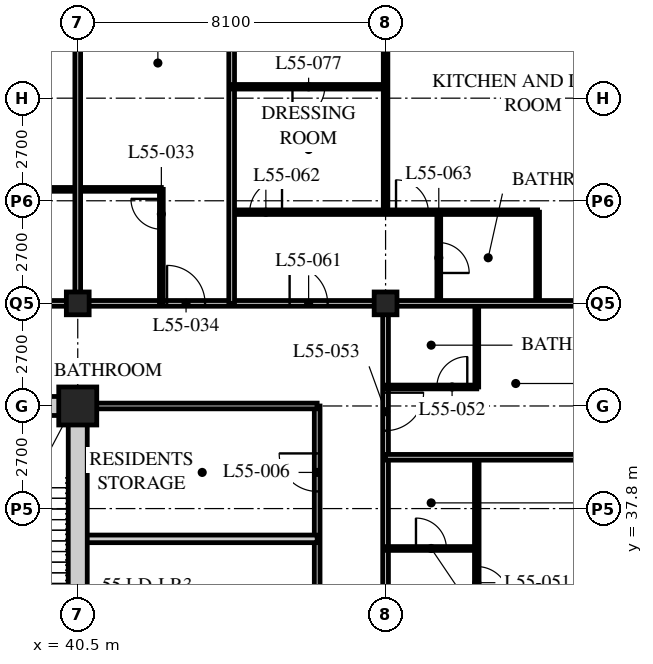
"""IFC4 building model, lengths in metres.
Left out: names, types, materials, properties, quantities, classifications, styles, units other than length and angle.
Written with IfcOpenShell. Run it as: python <this file> out.ifc"""

import sys

from ifc_helpers import new_model, si_unit, direction, frame, frame_2d, origin, origin_2d, place, context, subcontext, project, spatial, rectangle, hollow_rectangle, extrude, element, fill, save


model = new_model("IFC4")
c1 = context("Model", 3, precision=1e-05, world=origin(), true_north=direction((0.0, 1.0)))
c2 = subcontext(c1, "Body", "Model", "MODEL_VIEW")
j1 = project(units=[si_unit("LENGTHUNIT", "METRE"), si_unit("PLANEANGLEUNIT", "RADIAN")], contexts=[c1])
p1 = place(None, origin())
s1 = spatial("IfcSite", under=j1, at=p1, CompositionType="ELEMENT")
p2 = place(p1, origin())
s2 = spatial("IfcBuilding", under=s1, at=p2, CompositionType="ELEMENT")
p3 = place(p2, frame((0.0, 0.0, 213.6)))
s3 = spatial("IfcBuildingStorey", under=s2, at=p3, CompositionType="ELEMENT", Elevation=213.6)
p4 = place(p3, frame((40.5, 40.5, 0.0), z_axis=(0.0, 0.0, 1.0), x_axis=(1.0, 0.0, 0.0)))
e1 = element("IfcColumn", 1, at=p4, inside=s3, PredefinedType="COLUMN", context=c2, shape_type="SweptSolid", body=[
    extrude(hollow_rectangle(XDim=1.0, YDim=1.0, WallThickness=0.1, at=origin_2d()), origin(), (0.0, 0.0, 1.0), 3.6),
])
for number, where, z_axis, x_axis in (
    (2, (40.5, 43.2, 0.0), (0.0, 0.0, 1.0), (1.0, 0.0, 0.0)),
    (3, (48.6, 43.2, 0.0), (0.0, 0.0, 1.0), (1.0, 0.0, 0.0)),
):
    element("IfcColumn", number, at=place(p3, frame(where, z_axis=z_axis, x_axis=x_axis)), inside=s3, PredefinedType="COLUMN", context=c2, shape_type="SweptSolid", body=[
        extrude(hollow_rectangle(XDim=0.6, YDim=0.6, WallThickness=0.05, at=origin_2d()), origin(), (0.0, 0.0, 1.0), 3.6),
    ])
p5 = place(p3, frame((12.15, 43.2, 0.0), z_axis=(0.0, 0.0, 1.0), x_axis=(1.0, 0.0, 0.0)))
e4 = element("IfcWall", 4, at=p5, inside=s3, PredefinedType="PARTITIONING", context=c2, shape_type="SweptSolid", body=[
    extrude(rectangle(XDim=36.45, YDim=0.15, at=frame_2d((18.225, 0.0))), origin(), (0.0, 0.0, 1.0), 2.778),
])
p6 = place(p5, frame((4.95, 0.0, 0.0)))
e5 = element("IfcOpeningElement", 5, at=p6, cuts=e4, PredefinedType="OPENING", context=c2, shape_type="SweptSolid", body=[
    extrude(rectangle(XDim=1.0, YDim=2.1, at=frame_2d((0.5, 1.05))), frame((0.0, 0.085, 0.0), z_axis=(0.0, -1.0, 0.0), x_axis=(1.0, 0.0, 0.0)), (0.0, 0.0, 1.0), 0.17),
])
p7 = place(p5, frame((25.0, 0.0, 0.0)))
e6 = element("IfcOpeningElement", 6, at=p7, cuts=e4, PredefinedType="OPENING", context=c2, shape_type="SweptSolid", body=[
    extrude(rectangle(XDim=1.0, YDim=2.1, at=frame_2d((0.5, 1.05))), frame((0.0, 0.085, 0.0), z_axis=(0.0, -1.0, 0.0), x_axis=(1.0, 0.0, 0.0)), (0.0, 0.0, 1.0), 0.17),
])
p8 = place(p5, frame((30.7, 0.0, 0.0)))
e7 = element("IfcOpeningElement", 7, at=p8, cuts=e4, PredefinedType="OPENING", context=c2, shape_type="SweptSolid", body=[
    extrude(rectangle(XDim=1.0, YDim=2.1, at=frame_2d((0.5, 1.05))), frame((0.0, 0.085, 0.0), z_axis=(0.0, -1.0, 0.0), x_axis=(1.0, 0.0, 0.0)), (0.0, 0.0, 1.0), 0.17),
])
p9 = place(p5, frame((33.925, 0.0, 0.0)))
e8 = element("IfcOpeningElement", 8, at=p9, cuts=e4, PredefinedType="OPENING", context=c2, shape_type="SweptSolid", body=[
    extrude(rectangle(XDim=1.0, YDim=2.1, at=frame_2d((0.5, 1.05))), frame((0.0, 0.085, 0.0), z_axis=(0.0, -1.0, 0.0), x_axis=(1.0, 0.0, 0.0)), (0.0, 0.0, 1.0), 0.17),
])
p10 = place(p5, frame((1.525, 0.0, 0.0)))
e9 = element("IfcOpeningElement", 9, at=p10, cuts=e4, PredefinedType="OPENING", context=c2, shape_type="SweptSolid", body=[
    extrude(rectangle(XDim=1.0, YDim=2.1, at=frame_2d((0.5, 1.05))), frame((0.0, 0.085, 0.0), z_axis=(0.0, -1.0, 0.0), x_axis=(1.0, 0.0, 0.0)), (0.0, 0.0, 1.0), 0.17),
])
p11 = place(p3, frame((48.6, 18.9, 0.0), z_axis=(0.0, 0.0, 1.0), x_axis=(0.0, 1.0, 0.0)))
e10 = element("IfcWall", 10, at=p11, inside=s3, PredefinedType="PARTITIONING", context=c2, shape_type="SweptSolid", body=[
    extrude(rectangle(XDim=24.3, YDim=0.15, at=frame_2d((12.15, 0.0))), origin(), (0.0, 0.0, 1.0), 2.778),
])
p12 = place(p11, frame((0.9, 0.0, 0.0)))
e11 = element("IfcOpeningElement", 11, at=p12, cuts=e10, PredefinedType="OPENING", context=c2, shape_type="SweptSolid", body=[
    extrude(rectangle(XDim=1.0, YDim=2.1, at=frame_2d((0.5, 1.05))), frame((0.0, 0.085, 0.0), z_axis=(0.0, -1.0, 0.0), x_axis=(1.0, 0.0, 0.0)), (0.0, 0.0, 1.0), 0.17),
])
p13 = place(p11, frame((20.95, 0.0, 0.0)))
e12 = element("IfcOpeningElement", 12, at=p13, cuts=e10, PredefinedType="OPENING", context=c2, shape_type="SweptSolid", body=[
    extrude(rectangle(XDim=1.0, YDim=2.1, at=frame_2d((0.5, 1.05))), frame((0.0, 0.085, 0.0), z_axis=(0.0, -1.0, 0.0), x_axis=(1.0, 0.0, 0.0)), (0.0, 0.0, 1.0), 0.17),
])
p14 = place(p3, frame((46.8, 20.7, 0.0), z_axis=(0.0, 0.0, 1.0), x_axis=(0.0, 1.0, 0.0)))
e13 = element("IfcWall", 13, at=p14, inside=s3, PredefinedType="PARTITIONING", context=c2, shape_type="SweptSolid", body=[
    extrude(rectangle(XDim=19.8, YDim=0.15, at=frame_2d((9.9, 0.0))), origin(), (0.0, 0.0, 1.0), 3.39),
])
p15 = place(p14, frame((4.052, 0.0, 0.0)))
e14 = element("IfcOpeningElement", 14, at=p15, cuts=e13, PredefinedType="OPENING", context=c2, shape_type="SweptSolid", body=[
    extrude(rectangle(XDim=1.0, YDim=2.1, at=frame_2d((0.5, 1.05))), frame((0.0, 0.085, 0.0), z_axis=(0.0, -1.0, 0.0), x_axis=(1.0, 0.0, 0.0)), (0.0, 0.0, 1.0), 0.17),
])
p16 = place(p14, frame((8.102, 0.0, 0.0)))
e15 = element("IfcOpeningElement", 15, at=p16, cuts=e13, PredefinedType="OPENING", context=c2, shape_type="SweptSolid", body=[
    extrude(rectangle(XDim=1.0, YDim=2.1, at=frame_2d((0.5, 1.05))), frame((0.0, 0.085, 0.0), z_axis=(0.0, -1.0, 0.0), x_axis=(1.0, 0.0, 0.0)), (0.0, 0.0, 1.0), 0.17),
])
p17 = place(p14, frame((13.502, 0.0, 0.0)))
e16 = element("IfcOpeningElement", 16, at=p17, cuts=e13, PredefinedType="OPENING", context=c2, shape_type="SweptSolid", body=[
    extrude(rectangle(XDim=1.0, YDim=2.1, at=frame_2d((0.5, 1.05))), frame((0.0, 0.085, 0.0), z_axis=(0.0, -1.0, 0.0), x_axis=(1.0, 0.0, 0.0)), (0.0, 0.0, 1.0), 0.17),
])
p18 = place(p14, frame((17.552, 0.0, 0.0)))
e17 = element("IfcOpeningElement", 17, at=p18, cuts=e13, PredefinedType="OPENING", context=c2, shape_type="SweptSolid", body=[
    extrude(rectangle(XDim=1.0, YDim=2.1, at=frame_2d((0.5, 1.05))), frame((0.0, 0.085, 0.0), z_axis=(0.0, -1.0, 0.0), x_axis=(1.0, 0.0, 0.0)), (0.0, 0.0, 1.0), 0.17),
])
p19 = place(p3, frame((46.8, 40.5, 0.0), z_axis=(0.0, 0.0, 1.0), x_axis=(-1.0, 0.0, 0.0)))
e18 = element("IfcWall", 18, at=p19, inside=s3, PredefinedType="PARTITIONING", context=c2, shape_type="SweptSolid", body=[
    extrude(rectangle(XDim=6.1, YDim=0.15, at=frame_2d((3.05, 0.0))), origin(), (0.0, 0.0, 1.0), 3.39),
])
p20 = place(p3, frame((46.8, 37.003, 0.0), z_axis=(0.0, 0.0, 1.0), x_axis=(-1.0, 0.0, 0.0)))
e19 = element("IfcWall", 19, at=p20, inside=s3, PredefinedType="SOLIDWALL", context=c2, shape_type="SweptSolid", body=[
    extrude(rectangle(XDim=6.3, YDim=0.2, at=frame_2d((3.15, 0.0))), origin(), (0.0, 0.0, 1.0), 3.39),
])
p21 = place(p3, frame((38.3, 46.2, 0.0), z_axis=(0.0, 0.0, 1.0), x_axis=(1.0, 0.0, 0.0)))
e20 = element("IfcWall", 20, at=p21, inside=s3, PredefinedType="PARTITIONING", context=c2, shape_type="SweptSolid", body=[
    extrude(rectangle(XDim=4.4, YDim=0.1, at=frame_2d((2.2, 0.0))), origin(), (0.0, 0.0, 1.0), 3.39),
])
p22 = place(p3, frame((40.5, 43.2, 0.0), z_axis=(0.0, 0.0, 1.0), x_axis=(0.0, 1.0, 0.0)))
e21 = element("IfcWall", 21, at=p22, inside=s3, PredefinedType="PARTITIONING", context=c2, shape_type="SweptSolid", body=[
    extrude(rectangle(XDim=15.9, YDim=0.15, at=frame_2d((7.95, 0.0))), origin(), (0.0, 0.0, 1.0), 2.778),
])
p23 = place(p3, frame((42.7, 43.2, 0.0), z_axis=(0.0, 0.0, 1.0), x_axis=(0.0, 1.0, 0.0)))
e22 = element("IfcWall", 22, at=p23, inside=s3, PredefinedType="PARTITIONING", context=c2, shape_type="SweptSolid", body=[
    extrude(rectangle(XDim=3.0, YDim=0.1, at=frame_2d((1.5, 0.0))), origin(), (0.0, 0.0, 1.0), 3.39),
])
p24 = place(p23, frame((1.95, 0.0, 0.0)))
e23 = element("IfcOpeningElement", 23, at=p24, cuts=e22, PredefinedType="OPENING", context=c2, shape_type="SweptSolid", body=[
    extrude(rectangle(XDim=0.8, YDim=2.1, at=frame_2d((0.4, 1.05))), frame((0.0, 0.06, 0.0), z_axis=(0.0, -1.0, 0.0), x_axis=(1.0, 0.0, 0.0)), (0.0, 0.0, 1.0), 0.12),
])
p25 = place(p3, frame((51.0, 18.9, 0.0), z_axis=(0.0, 0.0, 1.0), x_axis=(0.0, 1.0, 0.0)))
e24 = element("IfcWall", 24, at=p25, inside=s3, PredefinedType="PARTITIONING", context=c2, shape_type="SweptSolid", body=[
    extrude(rectangle(XDim=20.25, YDim=0.12, at=frame_2d((10.125, 0.0))), origin(), (0.0, 0.0, 1.0), 3.39),
])
p26 = place(p25, frame((0.975, 0.0, 0.0)))
e25 = element("IfcOpeningElement", 25, at=p26, cuts=e24, PredefinedType="OPENING", context=c2, shape_type="SweptSolid", body=[
    extrude(rectangle(XDim=0.85, YDim=2.1, at=frame_2d((0.425, 1.05))), frame((0.0, 0.07, 0.0), z_axis=(0.0, -1.0, 0.0), x_axis=(1.0, 0.0, 0.0)), (0.0, 0.0, 1.0), 0.14),
])
p27 = place(p25, frame((8.425, 0.0, 0.0)))
e26 = element("IfcOpeningElement", 26, at=p27, cuts=e24, PredefinedType="OPENING", context=c2, shape_type="SweptSolid", body=[
    extrude(rectangle(XDim=0.85, YDim=2.1, at=frame_2d((0.425, 1.05))), frame((0.0, 0.07, 0.0), z_axis=(0.0, -1.0, 0.0), x_axis=(1.0, 0.0, 0.0)), (0.0, 0.0, 1.0), 0.14),
])
p28 = place(p25, frame((12.475, 0.0, 0.0)))
e27 = element("IfcOpeningElement", 27, at=p28, cuts=e24, PredefinedType="OPENING", context=c2, shape_type="SweptSolid", body=[
    extrude(rectangle(XDim=0.85, YDim=2.1, at=frame_2d((0.425, 1.05))), frame((0.0, 0.07, 0.0), z_axis=(0.0, -1.0, 0.0), x_axis=(1.0, 0.0, 0.0)), (0.0, 0.0, 1.0), 0.14),
])
p29 = place(p25, frame((16.525, 0.0, 0.0)))
e28 = element("IfcOpeningElement", 28, at=p29, cuts=e24, PredefinedType="OPENING", context=c2, shape_type="SweptSolid", body=[
    extrude(rectangle(XDim=0.85, YDim=2.1, at=frame_2d((0.425, 1.05))), frame((0.0, 0.07, 0.0), z_axis=(0.0, -1.0, 0.0), x_axis=(1.0, 0.0, 0.0)), (0.0, 0.0, 1.0), 0.14),
])
p30 = place(p3, frame((48.6, 36.75, 0.0), z_axis=(0.0, 0.0, 1.0), x_axis=(1.0, 0.0, 0.0)))
e29 = element("IfcWall", 29, at=p30, inside=s3, PredefinedType="PARTITIONING", context=c2, shape_type="SweptSolid", body=[
    extrude(rectangle(XDim=2.4, YDim=0.1, at=frame_2d((1.2, 0.0))), origin(), (0.0, 0.0, 1.0), 3.39),
])
p31 = place(p30, frame((0.8, 0.0, 0.0)))
e30 = element("IfcOpeningElement", 30, at=p31, cuts=e29, PredefinedType="OPENING", context=c2, shape_type="SweptSolid", body=[
    extrude(rectangle(XDim=0.8, YDim=2.1, at=frame_2d((0.4, 1.05))), frame((0.0, 0.06, 0.0), z_axis=(0.0, -1.0, 0.0), x_axis=(1.0, 0.0, 0.0)), (0.0, 0.0, 1.0), 0.12),
])
p32 = place(p3, frame((48.6, 39.15, 0.0), z_axis=(0.0, 0.0, 1.0), x_axis=(1.0, 0.0, 0.0)))
e31 = element("IfcWall", 31, at=p32, inside=s3, PredefinedType="PARTITIONING", context=c2, shape_type="SweptSolid", body=[
    extrude(rectangle(XDim=7.8, YDim=0.15, at=frame_2d((3.9, 0.0))), origin(), (0.0, 0.0, 1.0), 3.39),
])
p33 = place(p3, frame((51.0, 41.0, 0.0), z_axis=(0.0, 0.0, 1.0), x_axis=(0.0, 1.0, 0.0)))
e32 = element("IfcWall", 32, at=p33, inside=s3, PredefinedType="PARTITIONING", context=c2, shape_type="SweptSolid", body=[
    extrude(rectangle(XDim=2.2, YDim=0.1, at=frame_2d((1.1, 0.0))), origin(), (0.0, 0.0, 1.0), 3.39),
])
p34 = place(p3, frame((48.6, 41.0, 0.0), z_axis=(0.0, 0.0, 1.0), x_axis=(1.0, 0.0, 0.0)))
e33 = element("IfcWall", 33, at=p34, inside=s3, PredefinedType="PARTITIONING", context=c2, shape_type="SweptSolid", body=[
    extrude(rectangle(XDim=2.4, YDim=0.1, at=frame_2d((1.2, 0.0))), origin(), (0.0, 0.0, 1.0), 3.39),
])
p35 = place(p34, frame((1.35, 0.0, 0.0)))
e34 = element("IfcOpeningElement", 34, at=p35, cuts=e33, PredefinedType="OPENING", context=c2, shape_type="SweptSolid", body=[
    extrude(rectangle(XDim=0.8, YDim=2.1, at=frame_2d((0.4, 1.05))), frame((0.0, 0.06, 0.0), z_axis=(0.0, -1.0, 0.0), x_axis=(1.0, 0.0, 0.0)), (0.0, 0.0, 1.0), 0.12),
])
p36 = place(p3, frame((44.55, 45.6, 0.0), z_axis=(0.0, 0.0, 1.0), x_axis=(1.0, 0.0, 0.0)))
e35 = element("IfcWall", 35, at=p36, inside=s3, PredefinedType="PARTITIONING", context=c2, shape_type="SweptSolid", body=[
    extrude(rectangle(XDim=8.05, YDim=0.12, at=frame_2d((4.025, 0.0))), origin(), (0.0, 0.0, 1.0), 3.39),
])
p37 = place(p36, frame((0.475, 0.0, 0.0)))
e36 = element("IfcOpeningElement", 36, at=p37, cuts=e35, PredefinedType="OPENING", context=c2, shape_type="SweptSolid", body=[
    extrude(rectangle(XDim=0.85, YDim=2.1, at=frame_2d((0.425, 1.05))), frame((0.0, 0.07, 0.0), z_axis=(0.0, -1.0, 0.0), x_axis=(1.0, 0.0, 0.0)), (0.0, 0.0, 1.0), 0.14),
])
p38 = place(p36, frame((4.325, 0.0, 0.0)))
e37 = element("IfcOpeningElement", 37, at=p38, cuts=e35, PredefinedType="OPENING", context=c2, shape_type="SweptSolid", body=[
    extrude(rectangle(XDim=0.85, YDim=2.1, at=frame_2d((0.425, 1.05))), frame((0.0, 0.07, 0.0), z_axis=(0.0, -1.0, 0.0), x_axis=(1.0, 0.0, 0.0)), (0.0, 0.0, 1.0), 0.14),
])
p39 = place(p3, frame((50.0, 43.2, 0.0), z_axis=(0.0, 0.0, 1.0), x_axis=(0.0, 1.0, 0.0)))
e38 = element("IfcWall", 38, at=p39, inside=s3, PredefinedType="PARTITIONING", context=c2, shape_type="SweptSolid", body=[
    extrude(rectangle(XDim=2.4, YDim=0.1, at=frame_2d((1.2, 0.0))), origin(), (0.0, 0.0, 1.0), 3.39),
])
p40 = place(p39, frame((0.8, 0.0, 0.0)))
e39 = element("IfcOpeningElement", 39, at=p40, cuts=e38, PredefinedType="OPENING", context=c2, shape_type="SweptSolid", body=[
    extrude(rectangle(XDim=0.8, YDim=2.1, at=frame_2d((0.4, 1.05))), frame((0.0, 0.06, 0.0), z_axis=(0.0, -1.0, 0.0), x_axis=(1.0, 0.0, 0.0)), (0.0, 0.0, 1.0), 0.12),
])
p41 = place(p3, frame((52.6, 43.2, 0.0), z_axis=(0.0, 0.0, 1.0), x_axis=(0.0, 1.0, 0.0)))
e40 = element("IfcWall", 40, at=p41, inside=s3, PredefinedType="PARTITIONING", context=c2, shape_type="SweptSolid", body=[
    extrude(rectangle(XDim=2.4, YDim=0.1, at=frame_2d((1.2, 0.0))), origin(), (0.0, 0.0, 1.0), 3.39),
])
p42 = place(p3, frame((48.6, 45.6, 0.0), z_axis=(0.0, 0.0, 1.0), x_axis=(0.0, 1.0, 0.0)))
e41 = element("IfcWall", 41, at=p42, inside=s3, PredefinedType="PARTITIONING", context=c2, shape_type="SweptSolid", body=[
    extrude(rectangle(XDim=9.45, YDim=0.12, at=frame_2d((4.725, 0.0))), origin(), (0.0, 0.0, 1.0), 2.778),
])
p43 = place(p3, frame((48.6, 43.2, 0.0), z_axis=(0.0, 0.0, 1.0), x_axis=(1.0, 0.0, 0.0)))
e42 = element("IfcWall", 42, at=p43, inside=s3, PredefinedType="PARTITIONING", context=c2, shape_type="SweptSolid", body=[
    extrude(rectangle(XDim=7.8, YDim=0.15, at=frame_2d((3.9, 0.0))), origin(), (0.0, 0.0, 1.0), 2.778),
])
p44 = place(p3, frame((44.55, 43.2, 0.0), z_axis=(0.0, 0.0, 1.0), x_axis=(0.0, 1.0, 0.0)))
e43 = element("IfcWall", 43, at=p44, inside=s3, PredefinedType="PARTITIONING", context=c2, shape_type="SweptSolid", body=[
    extrude(rectangle(XDim=15.9, YDim=0.15, at=frame_2d((7.95, 0.0))), origin(), (0.0, 0.0, 1.0), 3.39),
])
p45 = place(p3, frame((44.55, 48.9, 0.0), z_axis=(0.0, 0.0, 1.0), x_axis=(1.0, 0.0, 0.0)))
e44 = element("IfcWall", 44, at=p45, inside=s3, PredefinedType="PARTITIONING", context=c2, shape_type="SweptSolid", body=[
    extrude(rectangle(XDim=4.05, YDim=0.12, at=frame_2d((2.025, 0.0))), origin(), (0.0, 0.0, 1.0), 3.39),
])
p46 = place(p45, frame((1.6, 0.0, 0.0)))
e45 = element("IfcOpeningElement", 45, at=p46, cuts=e44, PredefinedType="OPENING", context=c2, shape_type="SweptSolid", body=[
    extrude(rectangle(XDim=0.85, YDim=2.1, at=frame_2d((0.425, 1.05))), frame((0.0, 0.07, 0.0), z_axis=(0.0, -1.0, 0.0), x_axis=(1.0, 0.0, 0.0)), (0.0, 0.0, 1.0), 0.14),
])
p47 = place(p3, frame((15.95, 40.5, 0.0), z_axis=(0.0, 0.0, 1.0), x_axis=(1.0, 0.0, 0.0)))
e46 = element("IfcWall", 46, at=p47, inside=s3, PredefinedType="SOLIDWALL", context=c2, shape_type="SweptSolid", body=[
    extrude(rectangle(XDim=24.8, YDim=0.5, at=frame_2d((12.4, 0.0))), origin(), (0.0, 0.0, 1.0), 2.74),
])
p48 = place(p47, frame((11.5, 0.0, 0.0)))
e47 = element("IfcOpeningElement", 47, at=p48, cuts=e46, PredefinedType="OPENING", context=c2, shape_type="SweptSolid", body=[
    extrude(rectangle(XDim=1.8, YDim=2.4, at=frame_2d((0.9, 1.2))), frame((0.0, 0.26, 0.0), z_axis=(0.0, -1.0, 0.0), x_axis=(1.0, 0.0, 0.0)), (0.0, 0.0, 1.0), 0.52),
])
p49 = place(p3, frame((40.5, 24.55, 0.0), z_axis=(0.0, 0.0, 1.0), x_axis=(0.0, 1.0, 0.0)))
e48 = element("IfcWall", 48, at=p49, inside=s3, PredefinedType="SOLIDWALL", context=c2, shape_type="SweptSolid", body=[
    extrude(rectangle(XDim=15.7, YDim=0.5, at=frame_2d((7.85, 0.0))), origin(), (0.0, 0.0, 1.0), 2.778),
])
p50 = place(p18, origin())
e49 = element("IfcDoor", 49, at=p50, inside=s3, OperationType="SINGLE_SWING_RIGHT", PredefinedType="DOOR", context=c2, shape_type="SweptSolid", body=[
    extrude(rectangle(XDim=1.0, YDim=2.1, at=frame_2d((0.5, 1.05))), frame((0.0, 0.025, 0.0), z_axis=(0.0, -1.0, 0.0), x_axis=(1.0, 0.0, 0.0)), (0.0, 0.0, 1.0), 0.05),
])
fill(e17, e49)
p51 = place(p24, origin())
e50 = element("IfcDoor", 50, at=p51, inside=s3, OperationType="SINGLE_SWING_RIGHT", PredefinedType="DOOR", context=c2, shape_type="SweptSolid", body=[
    extrude(rectangle(XDim=0.8, YDim=2.1, at=frame_2d((0.4, 1.05))), frame((0.0, 0.025, 0.0), z_axis=(0.0, -1.0, 0.0), x_axis=(1.0, 0.0, 0.0)), (0.0, 0.0, 1.0), 0.05),
])
fill(e23, e50)
p52 = place(p8, origin())
e51 = element("IfcDoor", 51, at=p52, inside=s3, OperationType="SINGLE_SWING_LEFT", PredefinedType="DOOR", context=c2, shape_type="SweptSolid", body=[
    extrude(rectangle(XDim=1.0, YDim=2.1, at=frame_2d((0.5, 1.05))), frame((0.0, 0.025, 0.0), z_axis=(0.0, -1.0, 0.0), x_axis=(1.0, 0.0, 0.0)), (0.0, 0.0, 1.0), 0.05),
])
fill(e7, e51)
p53 = place(p31, origin())
e52 = element("IfcDoor", 52, at=p53, inside=s3, OperationType="SINGLE_SWING_LEFT", PredefinedType="DOOR", context=c2, shape_type="SweptSolid", body=[
    extrude(rectangle(XDim=0.8, YDim=2.1, at=frame_2d((0.4, 1.05))), frame((0.0, 0.025, 0.0), z_axis=(0.0, -1.0, 0.0), x_axis=(1.0, 0.0, 0.0)), (0.0, 0.0, 1.0), 0.05),
])
fill(e30, e52)
p54 = place(p29, origin())
e53 = element("IfcDoor", 53, at=p54, inside=s3, OperationType="SINGLE_SWING_RIGHT", PredefinedType="DOOR", context=c2, shape_type="SweptSolid", body=[
    extrude(rectangle(XDim=0.85, YDim=2.1, at=frame_2d((0.425, 1.05))), frame((0.0, 0.025, 0.0), z_axis=(0.0, -1.0, 0.0), x_axis=(1.0, 0.0, 0.0)), (0.0, 0.0, 1.0), 0.05),
])
fill(e28, e53)
p55 = place(p35, origin())
e54 = element("IfcDoor", 54, at=p55, inside=s3, OperationType="SINGLE_SWING_RIGHT", PredefinedType="DOOR", context=c2, shape_type="SweptSolid", body=[
    extrude(rectangle(XDim=0.8, YDim=2.1, at=frame_2d((0.4, 1.05))), frame((0.0, 0.025, 0.0), z_axis=(0.0, -1.0, 0.0), x_axis=(1.0, 0.0, 0.0)), (0.0, 0.0, 1.0), 0.05),
])
fill(e34, e54)
p56 = place(p13, origin())
e55 = element("IfcDoor", 55, at=p56, inside=s3, OperationType="SINGLE_SWING_LEFT", PredefinedType="DOOR", context=c2, shape_type="SweptSolid", body=[
    extrude(rectangle(XDim=1.0, YDim=2.1, at=frame_2d((0.5, 1.05))), frame((0.0, 0.025, 0.0), z_axis=(0.0, -1.0, 0.0), x_axis=(1.0, 0.0, 0.0)), (0.0, 0.0, 1.0), 0.05),
])
fill(e12, e55)
p57 = place(p9, origin())
e56 = element("IfcDoor", 56, at=p57, inside=s3, OperationType="SINGLE_SWING_LEFT", PredefinedType="DOOR", context=c2, shape_type="SweptSolid", body=[
    extrude(rectangle(XDim=1.0, YDim=2.1, at=frame_2d((0.5, 1.05))), frame((0.0, 0.025, 0.0), z_axis=(0.0, -1.0, 0.0), x_axis=(1.0, 0.0, 0.0)), (0.0, 0.0, 1.0), 0.05),
])
fill(e8, e56)
p58 = place(p37, origin())
e57 = element("IfcDoor", 57, at=p58, inside=s3, OperationType="SINGLE_SWING_RIGHT", PredefinedType="DOOR", context=c2, shape_type="SweptSolid", body=[
    extrude(rectangle(XDim=0.85, YDim=2.1, at=frame_2d((0.425, 1.05))), frame((0.0, 0.025, 0.0), z_axis=(0.0, -1.0, 0.0), x_axis=(1.0, 0.0, 0.0)), (0.0, 0.0, 1.0), 0.05),
])
fill(e36, e57)
p59 = place(p40, origin())
e58 = element("IfcDoor", 58, at=p59, inside=s3, OperationType="SINGLE_SWING_RIGHT", PredefinedType="DOOR", context=c2, shape_type="SweptSolid", body=[
    extrude(rectangle(XDim=0.8, YDim=2.1, at=frame_2d((0.4, 1.05))), frame((0.0, 0.025, 0.0), z_axis=(0.0, -1.0, 0.0), x_axis=(1.0, 0.0, 0.0)), (0.0, 0.0, 1.0), 0.05),
])
fill(e39, e58)
p60 = place(p38, origin())
e59 = element("IfcDoor", 59, at=p60, inside=s3, OperationType="SINGLE_SWING_LEFT", PredefinedType="DOOR", context=c2, shape_type="SweptSolid", body=[
    extrude(rectangle(XDim=0.85, YDim=2.1, at=frame_2d((0.425, 1.05))), frame((0.0, 0.025, 0.0), z_axis=(0.0, -1.0, 0.0), x_axis=(1.0, 0.0, 0.0)), (0.0, 0.0, 1.0), 0.05),
])
fill(e37, e59)
p61 = place(p46, origin())
e60 = element("IfcDoor", 60, at=p61, inside=s3, OperationType="SINGLE_SWING_RIGHT", PredefinedType="DOOR", context=c2, shape_type="SweptSolid", body=[
    extrude(rectangle(XDim=0.85, YDim=2.1, at=frame_2d((0.425, 1.05))), frame((0.0, 0.025, 0.0), z_axis=(0.0, -1.0, 0.0), x_axis=(1.0, 0.0, 0.0)), (0.0, 0.0, 1.0), 0.05),
])
fill(e45, e60)
save(model, sys.argv[1])
